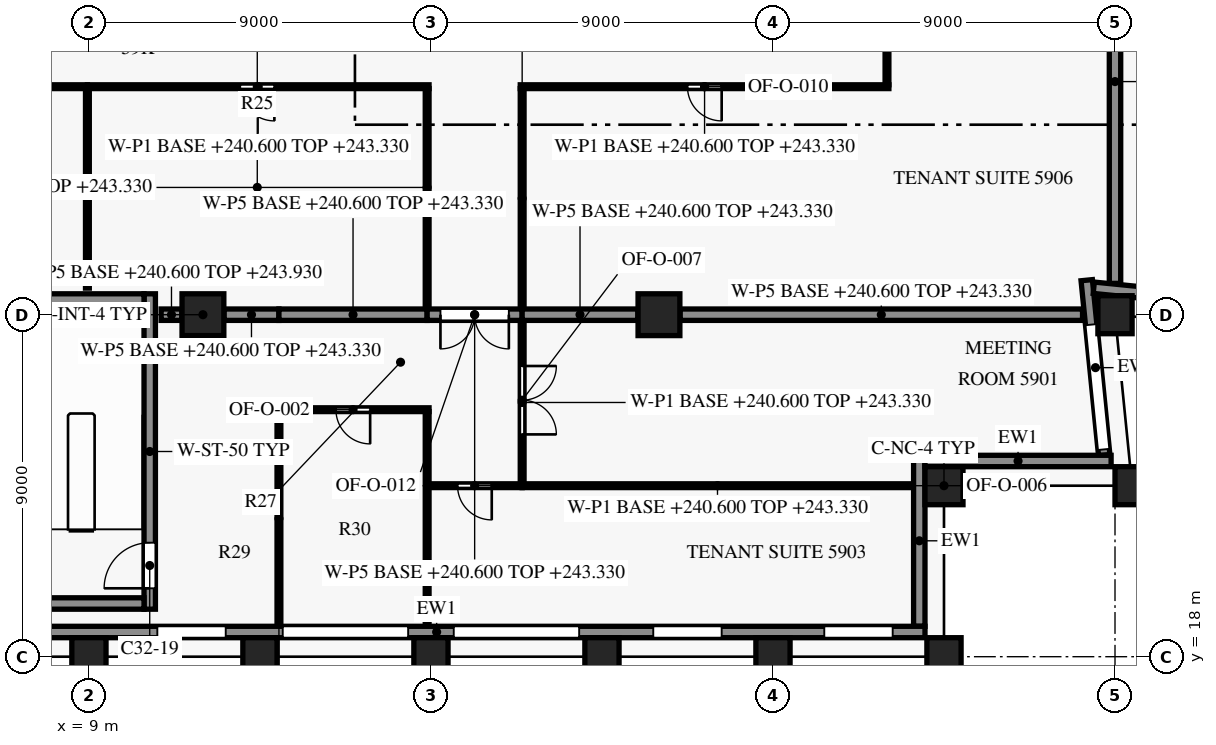
"""IFC4 building model, lengths in metres.
Left out: names, types, materials, properties, quantities, classifications, styles, units other than length and angle.
Written with IfcOpenShell. Run it as: python <this file> out.ifc"""

import sys

from ifc_helpers import new_model, si_unit, direction, frame, frame_2d, origin, origin_2d, place, context, subcontext, project, spatial, rectangle, extrude, element, fill, save


model = new_model("IFC4")
c1 = context("Model", 3, precision=1e-05, world=origin(), true_north=direction((0.0, 1.0)))
c2 = subcontext(c1, "Body", "Model", "MODEL_VIEW")
j1 = project(units=[si_unit("LENGTHUNIT", "METRE"), si_unit("PLANEANGLEUNIT", "RADIAN")], contexts=[c1])
p1 = place(None, origin())
s1 = spatial("IfcSite", under=j1, at=p1, CompositionType="ELEMENT")
p2 = place(p1, origin())
s2 = spatial("IfcBuilding", under=s1, at=p2, CompositionType="ELEMENT")
p3 = place(p2, frame((0.0, 0.0, 240.6)))
s3 = spatial("IfcBuildingStorey", under=s2, at=p3, CompositionType="ELEMENT", Elevation=240.6)
for number, where, z_axis, x_axis in (
    (1, (9.0, 18.0, 0.0), (0.0, 0.0, 1.0), (1.0, 0.0, 0.0)),
    (2, (13.5, 18.0, 0.0), (0.0, 0.0, 1.0), (1.0, 0.0, 0.0)),
    (3, (18.0, 18.0, 0.0), (0.0, 0.0, 1.0), (1.0, 0.0, 0.0)),
    (4, (22.5, 18.0, 0.0), (0.0, 0.0, 1.0), (1.0, 0.0, 0.0)),
    (5, (27.0, 18.0, 0.0), (0.0, 0.0, 1.0), (1.0, 0.0, 0.0)),
    (6, (31.5, 18.0, 0.0), (0.0, 0.0, 1.0), (1.0, 0.0, 0.0)),
    (7, (36.45, 22.5, 0.0), (0.0, 0.0, 1.0), (-0.1, 0.995, 0.0)),
    (8, (36.0, 27.0, 0.0), (0.0, 0.0, 1.0), (-0.1, 0.995, 0.0)),
):
    element("IfcColumn", number, at=place(p3, frame(where, z_axis=z_axis, x_axis=x_axis)), inside=s3, PredefinedType="COLUMN", context=c2, shape_type="SweptSolid", body=[
        extrude(rectangle(XDim=0.9, YDim=1.0, at=origin_2d()), origin(), (0.0, 0.0, 1.0), 3.8),
    ])
p4 = place(p3, frame((31.5, 22.5, 0.0), z_axis=(0.0, 0.0, 1.0), x_axis=(1.0, 0.0, 0.0)))
e9 = element("IfcColumn", 9, at=p4, inside=s3, PredefinedType="COLUMN", context=c2, shape_type="SweptSolid", body=[
    extrude(rectangle(XDim=1.0, YDim=1.0, at=origin_2d()), origin(), (0.0, 0.0, 1.0), 3.8),
])
for number, where, z_axis, x_axis in (
    (10, (12.0, 27.0, 0.0), (0.0, 0.0, 1.0), (1.0, 0.0, 0.0)),
    (11, (24.0, 27.0, 0.0), (0.0, 0.0, 1.0), (1.0, 0.0, 0.0)),
):
    element("IfcColumn", number, at=place(p3, frame(where, z_axis=z_axis, x_axis=x_axis)), inside=s3, PredefinedType="COLUMN", context=c2, shape_type="SweptSolid", body=[
        extrude(rectangle(XDim=1.1, YDim=1.1, at=origin_2d()), origin(), (0.0, 0.0, 1.0), 3.8),
    ])
p5 = place(p3, frame((31.0, 18.65, 0.0), z_axis=(0.0, 0.0, 1.0), x_axis=(-1.0, 0.0, 0.0)))
e12 = element("IfcWall", 12, at=p5, inside=s3, PredefinedType="SOLIDWALL", context=c2, shape_type="SweptSolid", body=[
    extrude(rectangle(XDim=25.7, YDim=0.3, at=frame_2d((12.85, 0.0))), origin(), (0.0, 0.0, 1.0), 3.15),
])
p6 = place(p5, frame((0.85, 0.0, 0.75)))
e13 = element("IfcOpeningElement", 13, at=p6, cuts=e12, PredefinedType="OPENING", context=c2, shape_type="SweptSolid", body=[
    extrude(rectangle(XDim=1.8, YDim=1.8, at=frame_2d((0.9, 0.9))), frame((0.0, 0.16, 0.0), z_axis=(0.0, -1.0, 0.0), x_axis=(1.0, 0.0, 0.0)), (0.0, 0.0, 1.0), 0.32),
])
p7 = place(p5, frame((5.35, 0.0, 0.75)))
e14 = element("IfcOpeningElement", 14, at=p7, cuts=e12, PredefinedType="OPENING", context=c2, shape_type="SweptSolid", body=[
    extrude(rectangle(XDim=1.8, YDim=1.8, at=frame_2d((0.9, 0.9))), frame((0.0, 0.16, 0.0), z_axis=(0.0, -1.0, 0.0), x_axis=(1.0, 0.0, 0.0)), (0.0, 0.0, 1.0), 0.32),
])
p8 = place(p5, frame((9.1, 0.0, 0.15)))
e15 = element("IfcOpeningElement", 15, at=p8, cuts=e12, PredefinedType="OPENING", context=c2, shape_type="SweptSolid", body=[
    extrude(rectangle(XDim=3.3, YDim=2.4, at=frame_2d((1.65, 1.2))), frame((0.0, 0.16, 0.0), z_axis=(0.0, -1.0, 0.0), x_axis=(1.0, 0.0, 0.0)), (0.0, 0.0, 1.0), 0.32),
])
p9 = place(p5, frame((13.6, 0.0, 0.15)))
e16 = element("IfcOpeningElement", 16, at=p9, cuts=e12, PredefinedType="OPENING", context=c2, shape_type="SweptSolid", body=[
    extrude(rectangle(XDim=3.3, YDim=2.4, at=frame_2d((1.65, 1.2))), frame((0.0, 0.16, 0.0), z_axis=(0.0, -1.0, 0.0), x_axis=(1.0, 0.0, 0.0)), (0.0, 0.0, 1.0), 0.32),
])
p10 = place(p5, frame((18.4, 0.0, 0.75)))
e17 = element("IfcOpeningElement", 17, at=p10, cuts=e12, PredefinedType="OPENING", context=c2, shape_type="SweptSolid", body=[
    extrude(rectangle(XDim=1.8, YDim=1.8, at=frame_2d((0.9, 0.9))), frame((0.0, 0.16, 0.0), z_axis=(0.0, -1.0, 0.0), x_axis=(1.0, 0.0, 0.0)), (0.0, 0.0, 1.0), 0.32),
])
p11 = place(p3, frame((30.85, 23.3, 0.0), z_axis=(0.0, 0.0, 1.0), x_axis=(0.0, -1.0, 0.0)))
e18 = element("IfcWall", 18, at=p11, inside=s3, PredefinedType="SOLIDWALL", context=c2, shape_type="SweptSolid", body=[
    extrude(rectangle(XDim=4.5, YDim=0.3, at=frame_2d((2.25, 0.0))), origin(), (0.0, 0.0, 1.0), 3.15),
])
p12 = place(p3, frame((35.897, 23.15, 0.0), z_axis=(0.0, 0.0, 1.0), x_axis=(-1.0, 0.0, 0.0)))
e19 = element("IfcWall", 19, at=p12, inside=s3, PredefinedType="SOLIDWALL", context=c2, shape_type="SweptSolid", body=[
    extrude(rectangle(XDim=4.897, YDim=0.3, at=frame_2d((2.449, 0.0))), origin(), (0.0, 0.0, 1.0), 3.15),
])
p13 = place(p3, frame((35.256, 27.908, 0.0), z_axis=(0.0, 0.0, 1.0), x_axis=(0.099535070904, -0.995034054523, 0.0)))
e20 = element("IfcWall", 20, at=p13, inside=s3, PredefinedType="SOLIDWALL", context=c2, shape_type="SweptSolid", body=[
    extrude(rectangle(XDim=4.626, YDim=0.3, at=frame_2d((2.313, 0.0))), origin(), (0.0, 0.0, 1.0), 3.15),
])
p14 = place(p13, frame((1.176, 0.0, 0.15)))
e21 = element("IfcOpeningElement", 21, at=p14, cuts=e20, PredefinedType="OPENING", context=c2, shape_type="SweptSolid", body=[
    extrude(rectangle(XDim=3.3, YDim=2.4, at=frame_2d((1.65, 1.2))), frame((0.0, 0.16, 0.0), z_axis=(0.0, -1.0, 0.0), x_axis=(1.0, 0.0, 0.0)), (0.0, 0.0, 1.0), 0.32),
])
p15 = place(p3, frame((45.015, 26.752, 0.0), z_axis=(0.0, 0.0, 1.0), x_axis=(-0.9950379439, 0.099496181828, 0.0)))
e22 = element("IfcWall", 22, at=p15, inside=s3, PredefinedType="SOLIDWALL", context=c2, shape_type="SweptSolid", body=[
    extrude(rectangle(XDim=9.621, YDim=0.3, at=frame_2d((4.811, 0.0))), origin(), (0.0, 0.0, 1.0), 3.15),
])
p16 = place(p15, frame((1.311, 0.0, 0.75)))
e23 = element("IfcOpeningElement", 23, at=p16, cuts=e22, PredefinedType="OPENING", context=c2, shape_type="SweptSolid", body=[
    extrude(rectangle(XDim=1.8, YDim=1.8, at=frame_2d((0.9, 0.9))), frame((0.0, 0.16, 0.0), z_axis=(0.0, -1.0, 0.0), x_axis=(1.0, 0.0, 0.0)), (0.0, 0.0, 1.0), 0.32),
])
p17 = place(p15, frame((5.083, 0.0, 0.15)))
e24 = element("IfcOpeningElement", 24, at=p17, cuts=e22, PredefinedType="OPENING", context=c2, shape_type="SweptSolid", body=[
    extrude(rectangle(XDim=3.3, YDim=2.4, at=frame_2d((1.65, 1.2))), frame((0.0, 0.16, 0.0), z_axis=(0.0, -1.0, 0.0), x_axis=(1.0, 0.0, 0.0)), (0.0, 0.0, 1.0), 0.32),
])
for number, where, z_axis, x_axis in (
    (25, (7.15, 19.4, 0.0), (0.0, 0.0, 1.0), (1.0, 0.0, 0.0)),
    (26, (7.15, 27.4, 0.0), (0.0, 0.0, 1.0), (1.0, 0.0, 0.0)),
):
    element("IfcWall", number, at=place(p3, frame(where, z_axis=z_axis, x_axis=x_axis)), inside=s3, PredefinedType="SHEAR", context=c2, shape_type="SweptSolid", body=[
        extrude(rectangle(XDim=3.3, YDim=0.3, at=frame_2d((1.65, 0.0))), origin(), (0.0, 0.0, 1.0), 3.5),
    ])
p18 = place(p3, frame((10.6, 19.25, 0.0), z_axis=(0.0, 0.0, 1.0), x_axis=(0.0, 1.0, 0.0)))
e27 = element("IfcWall", 27, at=p18, inside=s3, PredefinedType="SHEAR", context=c2, shape_type="SweptSolid", body=[
    extrude(rectangle(XDim=8.3, YDim=0.3, at=frame_2d((4.15, 0.0))), origin(), (0.0, 0.0, 1.0), 3.5),
])
p19 = place(p18, frame((0.55, 0.0, 0.0)))
e28 = element("IfcOpeningElement", 28, at=p19, cuts=e27, PredefinedType="OPENING", context=c2, shape_type="SweptSolid", body=[
    extrude(rectangle(XDim=1.2, YDim=2.2, at=frame_2d((0.6, 1.1))), frame((0.0, 0.16, 0.0), z_axis=(0.0, -1.0, 0.0), x_axis=(1.0, 0.0, 0.0)), (0.0, 0.0, 1.0), 0.32),
])
p20 = place(p3, frame((17.9, 22.45, 0.0), z_axis=(0.0, 0.0, 1.0), x_axis=(0.0, -1.0, 0.0)))
e29 = element("IfcWall", 29, at=p20, inside=s3, PredefinedType="PARTITIONING", context=c2, shape_type="SweptSolid", body=[
    extrude(rectangle(XDim=3.63, YDim=0.1, at=frame_2d((1.815, 0.0))), origin(), (0.0, 0.0, 1.0), 3.33),
])
p21 = place(p3, frame((20.4, 22.5, 0.0), z_axis=(0.0, 0.0, 1.0), x_axis=(-1.0, 0.0, 0.0)))
e30 = element("IfcWall", 30, at=p21, inside=s3, PredefinedType="PARTITIONING", context=c2, shape_type="SweptSolid", body=[
    extrude(rectangle(XDim=2.45, YDim=0.1, at=frame_2d((1.225, 0.0))), origin(), (0.0, 0.0, 1.0), 3.33),
])
p22 = place(p21, frame((0.8, 0.0, 0.0)))
e31 = element("IfcOpeningElement", 31, at=p22, cuts=e30, PredefinedType="OPENING", context=c2, shape_type="SweptSolid", body=[
    extrude(rectangle(XDim=0.9, YDim=2.1, at=frame_2d((0.45, 1.05))), frame((0.0, 0.06, 0.0), z_axis=(0.0, -1.0, 0.0), x_axis=(1.0, 0.0, 0.0)), (0.0, 0.0, 1.0), 0.12),
])
p23 = place(p3, frame((20.4, 22.5, 0.0), z_axis=(0.0, 0.0, 1.0), x_axis=(1.0, 0.0, 0.0)))
e32 = element("IfcWall", 32, at=p23, inside=s3, PredefinedType="PARTITIONING", context=c2, shape_type="SweptSolid", body=[
    extrude(rectangle(XDim=10.28, YDim=0.1, at=frame_2d((5.14, 0.0))), origin(), (0.0, 0.0, 1.0), 2.73),
])
p24 = place(p3, frame((17.9, 22.55, 0.0), z_axis=(0.0, 0.0, 1.0), x_axis=(0.0, 1.0, 0.0)))
e33 = element("IfcWall", 33, at=p24, inside=s3, PredefinedType="PARTITIONING", context=c2, shape_type="SweptSolid", body=[
    extrude(rectangle(XDim=1.9, YDim=0.1, at=frame_2d((0.95, 0.0))), origin(), (0.0, 0.0, 1.0), 3.33),
])
p25 = place(p3, frame((14.0, 24.45, 0.0), z_axis=(0.0, 0.0, 1.0), x_axis=(0.0, -1.0, 0.0)))
e34 = element("IfcWall", 34, at=p25, inside=s3, PredefinedType="PARTITIONING", context=c2, shape_type="SweptSolid", body=[
    extrude(rectangle(XDim=5.63, YDim=0.1, at=frame_2d((2.815, 0.0))), origin(), (0.0, 0.0, 1.0), 3.33),
])
p26 = place(p3, frame((17.95, 24.5, 0.0), z_axis=(0.0, 0.0, 1.0), x_axis=(-1.0, 0.0, 0.0)))
e35 = element("IfcWall", 35, at=p26, inside=s3, PredefinedType="PARTITIONING", context=c2, shape_type="SweptSolid", body=[
    extrude(rectangle(XDim=4.0, YDim=0.1, at=frame_2d((2.0, 0.0))), origin(), (0.0, 0.0, 1.0), 3.33),
])
p27 = place(p26, frame((1.55, 0.0, 0.0)))
e36 = element("IfcOpeningElement", 36, at=p27, cuts=e35, PredefinedType="OPENING", context=c2, shape_type="SweptSolid", body=[
    extrude(rectangle(XDim=0.9, YDim=2.1, at=frame_2d((0.45, 1.05))), frame((0.0, 0.06, 0.0), z_axis=(0.0, -1.0, 0.0), x_axis=(1.0, 0.0, 0.0)), (0.0, 0.0, 1.0), 0.12),
])
p28 = place(p3, frame((20.4, 26.83, 0.0), z_axis=(0.0, 0.0, 1.0), x_axis=(0.0, -1.0, 0.0)))
e37 = element("IfcWall", 37, at=p28, inside=s3, PredefinedType="PARTITIONING", context=c2, shape_type="SweptSolid", body=[
    extrude(rectangle(XDim=4.28, YDim=0.1, at=frame_2d((2.14, 0.0))), origin(), (0.0, 0.0, 1.0), 2.73),
])
p29 = place(p28, frame((1.18, 0.0, 0.0)))
e38 = element("IfcOpeningElement", 38, at=p29, cuts=e37, PredefinedType="OPENING", context=c2, shape_type="SweptSolid", body=[
    extrude(rectangle(XDim=1.8, YDim=2.1, at=frame_2d((0.9, 1.05))), frame((0.0, 0.06, 0.0), z_axis=(0.0, -1.0, 0.0), x_axis=(1.0, 0.0, 0.0)), (0.0, 0.0, 1.0), 0.12),
])
p30 = place(p3, frame((10.9, 27.0, 0.0), z_axis=(0.0, 0.0, 1.0), x_axis=(1.0, 0.0, 0.0)))
e39 = element("IfcWall", 39, at=p30, inside=s3, PredefinedType="PARTITIONING", context=c2, shape_type="SweptSolid", body=[
    extrude(rectangle(XDim=0.545, YDim=0.3, at=frame_2d((0.272, 0.0))), origin(), (0.0, 0.0, 1.0), 3.33),
])
p31 = place(p3, frame((12.555, 27.0, 0.0), z_axis=(0.0, 0.0, 1.0), x_axis=(1.0, 0.0, 0.0)))
e40 = element("IfcWall", 40, at=p31, inside=s3, PredefinedType="PARTITIONING", context=c2, shape_type="SweptSolid", body=[
    extrude(rectangle(XDim=1.445, YDim=0.3, at=frame_2d((0.723, 0.0))), origin(), (0.0, 0.0, 1.0), 2.73),
])
p32 = place(p3, frame((14.0, 27.0, 0.0), z_axis=(0.0, 0.0, 1.0), x_axis=(1.0, 0.0, 0.0)))
e41 = element("IfcWall", 41, at=p32, inside=s3, PredefinedType="PARTITIONING", context=c2, shape_type="SweptSolid", body=[
    extrude(rectangle(XDim=3.9, YDim=0.3, at=frame_2d((1.95, 0.0))), origin(), (0.0, 0.0, 1.0), 2.73),
])
p33 = place(p3, frame((20.4, 27.0, 0.0), z_axis=(0.0, 0.0, 1.0), x_axis=(-1.0, 0.0, 0.0)))
e42 = element("IfcWall", 42, at=p33, inside=s3, PredefinedType="PARTITIONING", context=c2, shape_type="SweptSolid", body=[
    extrude(rectangle(XDim=2.5, YDim=0.3, at=frame_2d((1.25, 0.0))), origin(), (0.0, 0.0, 1.0), 2.73),
])
p34 = place(p33, frame((0.35, 0.0, 0.0)))
e43 = element("IfcOpeningElement", 43, at=p34, cuts=e42, PredefinedType="OPENING", context=c2, shape_type="SweptSolid", body=[
    extrude(rectangle(XDim=1.8, YDim=2.1, at=frame_2d((0.9, 1.05))), frame((0.0, 0.16, 0.0), z_axis=(0.0, -1.0, 0.0), x_axis=(1.0, 0.0, 0.0)), (0.0, 0.0, 1.0), 0.32),
])
p35 = place(p3, frame((20.4, 27.0, 0.0), z_axis=(0.0, 0.0, 1.0), x_axis=(1.0, 0.0, 0.0)))
e44 = element("IfcWall", 44, at=p35, inside=s3, PredefinedType="PARTITIONING", context=c2, shape_type="SweptSolid", body=[
    extrude(rectangle(XDim=3.045, YDim=0.3, at=frame_2d((1.522, 0.0))), origin(), (0.0, 0.0, 1.0), 2.73),
])
p36 = place(p3, frame((24.555, 27.0, 0.0), z_axis=(0.0, 0.0, 1.0), x_axis=(1.0, 0.0, 0.0)))
e45 = element("IfcWall", 45, at=p36, inside=s3, PredefinedType="PARTITIONING", context=c2, shape_type="SweptSolid", body=[
    extrude(rectangle(XDim=10.591, YDim=0.3, at=frame_2d((5.295, 0.0))), origin(), (0.0, 0.0, 1.0), 2.73),
])
p37 = place(p3, frame((17.9, 27.17, 0.0), z_axis=(0.0, 0.0, 1.0), x_axis=(0.0, 1.0, 0.0)))
e46 = element("IfcWall", 46, at=p37, inside=s3, PredefinedType="PARTITIONING", context=c2, shape_type="SweptSolid", body=[
    extrude(rectangle(XDim=5.78, YDim=0.1, at=frame_2d((2.89, 0.0))), origin(), (0.0, 0.0, 1.0), 2.73),
])
p38 = place(p3, frame((36.0, 27.824, 0.0), z_axis=(0.0, 0.0, 1.0), x_axis=(0.0, 1.0, 0.0)))
e47 = element("IfcWall", 47, at=p38, inside=s3, PredefinedType="PARTITIONING", context=c2, shape_type="SweptSolid", body=[
    extrude(rectangle(XDim=10.621, YDim=0.3, at=frame_2d((5.311, 0.0))), origin(), (0.0, 0.0, 1.0), 2.73),
])
p39 = place(p3, frame((8.96, 32.95, 0.0), z_axis=(0.0, 0.0, 1.0), x_axis=(0.0, -1.0, 0.0)))
e48 = element("IfcWall", 48, at=p39, inside=s3, PredefinedType="PARTITIONING", context=c2, shape_type="SweptSolid", body=[
    extrude(rectangle(XDim=5.25, YDim=0.1, at=frame_2d((2.625, 0.0))), origin(), (0.0, 0.0, 1.0), 3.33),
])
p40 = place(p3, frame((20.4, 32.95, 0.0), z_axis=(0.0, 0.0, 1.0), x_axis=(0.0, -1.0, 0.0)))
e49 = element("IfcWall", 49, at=p40, inside=s3, PredefinedType="PARTITIONING", context=c2, shape_type="SweptSolid", body=[
    extrude(rectangle(XDim=5.78, YDim=0.1, at=frame_2d((2.89, 0.0))), origin(), (0.0, 0.0, 1.0), 2.73),
])
p41 = place(p3, frame((8.96, 33.0, 0.0), z_axis=(0.0, 0.0, 1.0), x_axis=(-1.0, 0.0, 0.0)))
e50 = element("IfcWall", 50, at=p41, inside=s3, PredefinedType="PARTITIONING", context=c2, shape_type="SweptSolid", body=[
    extrude(rectangle(XDim=2.51, YDim=0.1, at=frame_2d((1.255, 0.0))), origin(), (0.0, 0.0, 1.0), 3.33),
])
p42 = place(p3, frame((17.95, 33.0, 0.0), z_axis=(0.0, 0.0, 1.0), x_axis=(-1.0, 0.0, 0.0)))
e51 = element("IfcWall", 51, at=p42, inside=s3, PredefinedType="PARTITIONING", context=c2, shape_type="SweptSolid", body=[
    extrude(rectangle(XDim=8.99, YDim=0.1, at=frame_2d((4.495, 0.0))), origin(), (0.0, 0.0, 1.0), 2.73),
])
p43 = place(p42, frame((4.07, 0.0, 0.0)))
e52 = element("IfcOpeningElement", 52, at=p43, cuts=e51, PredefinedType="OPENING", context=c2, shape_type="SweptSolid", body=[
    extrude(rectangle(XDim=0.9, YDim=2.1, at=frame_2d((0.45, 1.05))), frame((0.0, 0.06, 0.0), z_axis=(0.0, -1.0, 0.0), x_axis=(1.0, 0.0, 0.0)), (0.0, 0.0, 1.0), 0.12),
])
p44 = place(p3, frame((30.05, 33.0, 0.0), z_axis=(0.0, 0.0, 1.0), x_axis=(-1.0, 0.0, 0.0)))
e53 = element("IfcWall", 53, at=p44, inside=s3, PredefinedType="PARTITIONING", context=c2, shape_type="SweptSolid", body=[
    extrude(rectangle(XDim=9.7, YDim=0.1, at=frame_2d((4.85, 0.0))), origin(), (0.0, 0.0, 1.0), 2.73),
])
p45 = place(p44, frame((4.4, 0.0, 0.0)))
e54 = element("IfcOpeningElement", 54, at=p45, cuts=e53, PredefinedType="OPENING", context=c2, shape_type="SweptSolid", body=[
    extrude(rectangle(XDim=0.9, YDim=2.1, at=frame_2d((0.45, 1.05))), frame((0.0, 0.06, 0.0), z_axis=(0.0, -1.0, 0.0), x_axis=(1.0, 0.0, 0.0)), (0.0, 0.0, 1.0), 0.12),
])
p46 = place(p3, frame((30.0, 44.94, 0.0), z_axis=(0.0, 0.0, 1.0), x_axis=(0.0, -1.0, 0.0)))
e55 = element("IfcWall", 55, at=p46, inside=s3, PredefinedType="PARTITIONING", context=c2, shape_type="SweptSolid", body=[
    extrude(rectangle(XDim=11.89, YDim=0.1, at=frame_2d((5.945, 0.0))), origin(), (0.0, 0.0, 1.0), 3.33),
])
p47 = place(p6, origin())
e56 = element("IfcWindow", 56, at=p47, inside=s3, PartitioningType="SINGLE_PANEL", PredefinedType="WINDOW", context=c2, shape_type="SweptSolid", body=[
    extrude(rectangle(XDim=1.8, YDim=1.8, at=frame_2d((0.9, 0.9))), frame((0.0, 0.03, 0.0), z_axis=(0.0, -1.0, 0.0), x_axis=(1.0, 0.0, 0.0)), (0.0, 0.0, 1.0), 0.06),
])
fill(e13, e56)
p48 = place(p7, origin())
e57 = element("IfcWindow", 57, at=p48, inside=s3, PartitioningType="SINGLE_PANEL", PredefinedType="WINDOW", context=c2, shape_type="SweptSolid", body=[
    extrude(rectangle(XDim=1.8, YDim=1.8, at=frame_2d((0.9, 0.9))), frame((0.0, 0.03, 0.0), z_axis=(0.0, -1.0, 0.0), x_axis=(1.0, 0.0, 0.0)), (0.0, 0.0, 1.0), 0.06),
])
fill(e14, e57)
p49 = place(p8, origin())
e58 = element("IfcWindow", 58, at=p49, inside=s3, PartitioningType="SINGLE_PANEL", PredefinedType="WINDOW", context=c2, shape_type="SweptSolid", body=[
    extrude(rectangle(XDim=3.3, YDim=2.4, at=frame_2d((1.65, 1.2))), frame((0.0, 0.03, 0.0), z_axis=(0.0, -1.0, 0.0), x_axis=(1.0, 0.0, 0.0)), (0.0, 0.0, 1.0), 0.06),
])
fill(e15, e58)
p50 = place(p9, origin())
e59 = element("IfcWindow", 59, at=p50, inside=s3, PartitioningType="SINGLE_PANEL", PredefinedType="WINDOW", context=c2, shape_type="SweptSolid", body=[
    extrude(rectangle(XDim=3.3, YDim=2.4, at=frame_2d((1.65, 1.2))), frame((0.0, 0.03, 0.0), z_axis=(0.0, -1.0, 0.0), x_axis=(1.0, 0.0, 0.0)), (0.0, 0.0, 1.0), 0.06),
])
fill(e16, e59)
p51 = place(p10, origin())
e60 = element("IfcWindow", 60, at=p51, inside=s3, PartitioningType="SINGLE_PANEL", PredefinedType="WINDOW", context=c2, shape_type="SweptSolid", body=[
    extrude(rectangle(XDim=1.8, YDim=1.8, at=frame_2d((0.9, 0.9))), frame((0.0, 0.03, 0.0), z_axis=(0.0, -1.0, 0.0), x_axis=(1.0, 0.0, 0.0)), (0.0, 0.0, 1.0), 0.06),
])
fill(e17, e60)
p52 = place(p14, origin())
e61 = element("IfcWindow", 61, at=p52, inside=s3, PartitioningType="SINGLE_PANEL", PredefinedType="WINDOW", context=c2, shape_type="SweptSolid", body=[
    extrude(rectangle(XDim=3.3, YDim=2.4, at=frame_2d((1.65, 1.2))), frame((0.0, 0.03, 0.0), z_axis=(0.0, -1.0, 0.0), x_axis=(1.0, 0.0, 0.0)), (0.0, 0.0, 1.0), 0.06),
])
fill(e21, e61)
p53 = place(p19, origin())
e62 = element("IfcDoor", 62, at=p53, inside=s3, OperationType="SINGLE_SWING_RIGHT", PredefinedType="DOOR", context=c2, shape_type="SweptSolid", body=[
    extrude(rectangle(XDim=1.2, YDim=2.2, at=frame_2d((0.6, 1.1))), frame((0.0, 0.025, 0.0), z_axis=(0.0, -1.0, 0.0), x_axis=(1.0, 0.0, 0.0)), (0.0, 0.0, 1.0), 0.05),
])
fill(e28, e62)
p54 = place(p27, origin())
e63 = element("IfcDoor", 63, at=p54, inside=s3, OperationType="SINGLE_SWING_RIGHT", PredefinedType="DOOR", context=c2, shape_type="SweptSolid", body=[
    extrude(rectangle(XDim=0.9, YDim=2.1, at=frame_2d((0.45, 1.05))), frame((0.0, 0.025, 0.0), z_axis=(0.0, -1.0, 0.0), x_axis=(1.0, 0.0, 0.0)), (0.0, 0.0, 1.0), 0.05),
])
fill(e36, e63)
p55 = place(p22, origin())
e64 = element("IfcDoor", 64, at=p55, inside=s3, OperationType="SINGLE_SWING_LEFT", PredefinedType="DOOR", context=c2, shape_type="SweptSolid", body=[
    extrude(rectangle(XDim=0.9, YDim=2.1, at=frame_2d((0.45, 1.05))), frame((0.0, 0.025, 0.0), z_axis=(0.0, -1.0, 0.0), x_axis=(1.0, 0.0, 0.0)), (0.0, 0.0, 1.0), 0.05),
])
fill(e31, e64)
p56 = place(p29, origin())
e65 = element("IfcDoor", 65, at=p56, inside=s3, OperationType="DOUBLE_DOOR_SINGLE_SWING", PredefinedType="DOOR", context=c2, shape_type="SweptSolid", body=[
    extrude(rectangle(XDim=1.8, YDim=2.1, at=frame_2d((0.9, 1.05))), frame((0.0, 0.025, 0.0), z_axis=(0.0, -1.0, 0.0), x_axis=(1.0, 0.0, 0.0)), (0.0, 0.0, 1.0), 0.05),
])
fill(e38, e65)
p57 = place(p43, origin())
e66 = element("IfcDoor", 66, at=p57, inside=s3, OperationType="SINGLE_SWING_RIGHT", PredefinedType="DOOR", context=c2, shape_type="SweptSolid", body=[
    extrude(rectangle(XDim=0.9, YDim=2.1, at=frame_2d((0.45, 1.05))), frame((0.0, 0.025, 0.0), z_axis=(0.0, -1.0, 0.0), x_axis=(1.0, 0.0, 0.0)), (0.0, 0.0, 1.0), 0.05),
])
fill(e52, e66)
p58 = place(p45, origin())
e67 = element("IfcDoor", 67, at=p58, inside=s3, OperationType="SINGLE_SWING_LEFT", PredefinedType="DOOR", context=c2, shape_type="SweptSolid", body=[
    extrude(rectangle(XDim=0.9, YDim=2.1, at=frame_2d((0.45, 1.05))), frame((0.0, 0.025, 0.0), z_axis=(0.0, -1.0, 0.0), x_axis=(1.0, 0.0, 0.0)), (0.0, 0.0, 1.0), 0.05),
])
fill(e54, e67)
p59 = place(p34, origin())
e68 = element("IfcDoor", 68, at=p59, inside=s3, OperationType="DOUBLE_DOOR_SINGLE_SWING", PredefinedType="DOOR", context=c2, shape_type="SweptSolid", body=[
    extrude(rectangle(XDim=1.8, YDim=2.1, at=frame_2d((0.9, 1.05))), frame((0.0, 0.025, 0.0), z_axis=(0.0, -1.0, 0.0), x_axis=(1.0, 0.0, 0.0)), (0.0, 0.0, 1.0), 0.05),
])
fill(e43, e68)
save(model, sys.argv[1])
